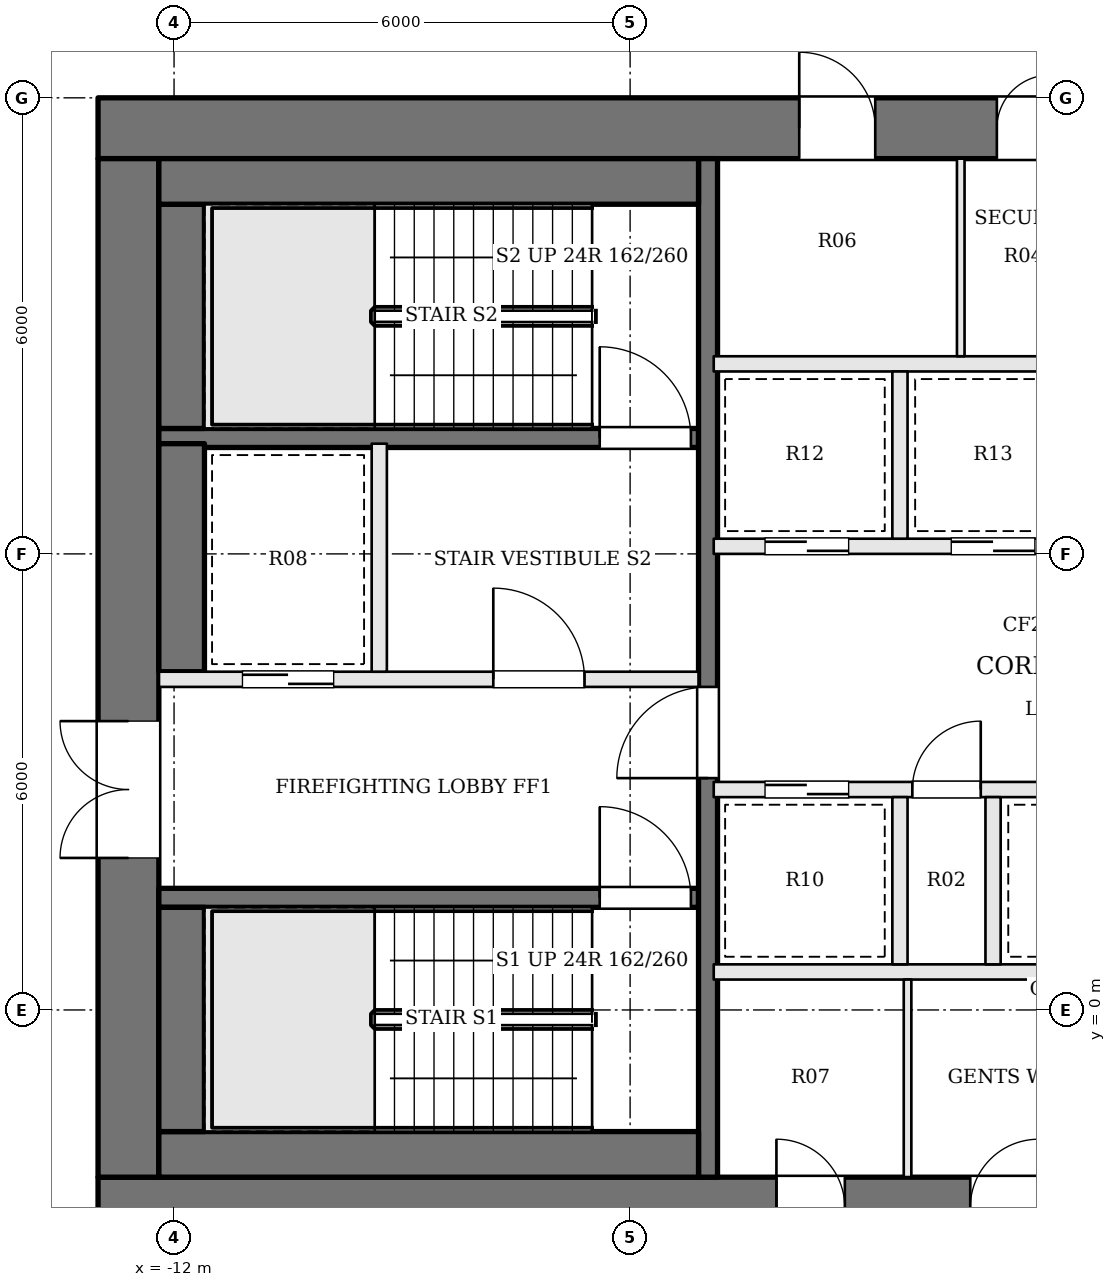
"""IFC4 building model, lengths in metres.
Left out: names, types, materials, properties, quantities, classifications, styles, units other than length and angle.
Written with IfcOpenShell. Run it as: python <this file> out.ifc"""

import sys

from ifc_helpers import new_model, si_unit, direction, frame, frame_2d, origin, place, context, subcontext, project, spatial, rectangle, extrude, element, fill, save


model = new_model("IFC4")
c1 = context("Model", 3, precision=1e-05, world=origin(), true_north=direction((0.0, 1.0)))
c2 = subcontext(c1, "Body", "Model", "MODEL_VIEW")
j1 = project(units=[si_unit("LENGTHUNIT", "METRE"), si_unit("PLANEANGLEUNIT", "RADIAN")], contexts=[c1])
p1 = place(None, origin())
s1 = spatial("IfcSite", under=j1, at=p1, CompositionType="ELEMENT")
p2 = place(p1, origin())
s2 = spatial("IfcBuilding", under=s1, at=p2, CompositionType="ELEMENT")
p3 = place(p2, frame((0.0, 0.0, 205.2)))
s3 = spatial("IfcBuildingStorey", under=s2, at=p3, CompositionType="ELEMENT", Elevation=205.2)
p4 = place(p3, frame((-13.0, 11.6, 0.0), z_axis=(0.0, 0.0, 1.0), x_axis=(1.0, 0.0, 0.0)))
e1 = element("IfcWall", 1, at=p4, inside=s3, PredefinedType="SHEAR", context=c2, shape_type="SweptSolid", body=[
    extrude(rectangle(XDim=26.0, YDim=0.8, at=frame_2d((13.0, 0.0))), origin(), (0.0, 0.0, 1.0), 3.9),
])
p5 = place(p4, frame((9.225, 0.0, 0.0)))
e2 = element("IfcOpeningElement", 2, at=p5, cuts=e1, PredefinedType="OPENING", context=c2, shape_type="SweptSolid", body=[
    extrude(rectangle(XDim=1.0, YDim=2.1, at=frame_2d((0.5, 1.05))), frame((0.0, 0.41, 0.0), z_axis=(0.0, -1.0, 0.0), x_axis=(1.0, 0.0, 0.0)), (0.0, 0.0, 1.0), 0.82),
])
p6 = place(p4, frame((11.825, 0.0, 0.0)))
e3 = element("IfcOpeningElement", 3, at=p6, cuts=e1, PredefinedType="OPENING", context=c2, shape_type="SweptSolid", body=[
    extrude(rectangle(XDim=0.7, YDim=2.1, at=frame_2d((0.35, 1.05))), frame((0.0, 0.41, 0.0), z_axis=(0.0, -1.0, 0.0), x_axis=(1.0, 0.0, 0.0)), (0.0, 0.0, 1.0), 0.82),
])
p7 = place(p4, frame((14.125, 0.0, 0.0)))
e4 = element("IfcOpeningElement", 4, at=p7, cuts=e1, PredefinedType="OPENING", context=c2, shape_type="SweptSolid", body=[
    extrude(rectangle(XDim=1.0, YDim=2.1, at=frame_2d((0.5, 1.05))), frame((0.0, 0.41, 0.0), z_axis=(0.0, -1.0, 0.0), x_axis=(1.0, 0.0, 0.0)), (0.0, 0.0, 1.0), 0.82),
])
p8 = place(p4, frame((16.625, 0.0, 0.0)))
e5 = element("IfcOpeningElement", 5, at=p8, cuts=e1, PredefinedType="OPENING", context=c2, shape_type="SweptSolid", body=[
    extrude(rectangle(XDim=0.9, YDim=2.1, at=frame_2d((0.45, 1.05))), frame((0.0, 0.41, 0.0), z_axis=(0.0, -1.0, 0.0), x_axis=(1.0, 0.0, 0.0)), (0.0, 0.0, 1.0), 0.82),
])
p9 = place(p3, frame((-13.0, -2.6, 0.0), z_axis=(0.0, 0.0, 1.0), x_axis=(1.0, 0.0, 0.0)))
e6 = element("IfcWall", 6, at=p9, inside=s3, PredefinedType="SHEAR", context=c2, shape_type="SweptSolid", body=[
    extrude(rectangle(XDim=26.0, YDim=0.8, at=frame_2d((13.0, 0.0))), origin(), (0.0, 0.0, 1.0), 3.9),
])
p10 = place(p9, frame((8.925, 0.0, 0.0)))
e7 = element("IfcOpeningElement", 7, at=p10, cuts=e6, PredefinedType="OPENING", context=c2, shape_type="SweptSolid", body=[
    extrude(rectangle(XDim=0.9, YDim=2.1, at=frame_2d((0.45, 1.05))), frame((0.0, 0.41, 0.0), z_axis=(0.0, -1.0, 0.0), x_axis=(1.0, 0.0, 0.0)), (0.0, 0.0, 1.0), 0.82),
])
p11 = place(p9, frame((11.475, 0.0, 0.0)))
e8 = element("IfcOpeningElement", 8, at=p11, cuts=e6, PredefinedType="OPENING", context=c2, shape_type="SweptSolid", body=[
    extrude(rectangle(XDim=0.9, YDim=2.1, at=frame_2d((0.45, 1.05))), frame((0.0, 0.41, 0.0), z_axis=(0.0, -1.0, 0.0), x_axis=(1.0, 0.0, 0.0)), (0.0, 0.0, 1.0), 0.82),
])
p12 = place(p9, frame((13.6, 0.0, 0.0)))
e9 = element("IfcOpeningElement", 9, at=p12, cuts=e6, PredefinedType="OPENING", context=c2, shape_type="SweptSolid", body=[
    extrude(rectangle(XDim=1.0, YDim=2.1, at=frame_2d((0.5, 1.05))), frame((0.0, 0.41, 0.0), z_axis=(0.0, -1.0, 0.0), x_axis=(1.0, 0.0, 0.0)), (0.0, 0.0, 1.0), 0.82),
])
p13 = place(p9, frame((15.95, 0.0, 0.0)))
e10 = element("IfcOpeningElement", 10, at=p13, cuts=e6, PredefinedType="OPENING", context=c2, shape_type="SweptSolid", body=[
    extrude(rectangle(XDim=1.0, YDim=2.1, at=frame_2d((0.5, 1.05))), frame((0.0, 0.41, 0.0), z_axis=(0.0, -1.0, 0.0), x_axis=(1.0, 0.0, 0.0)), (0.0, 0.0, 1.0), 0.82),
])
p14 = place(p3, frame((-12.6, -2.2, 0.0), z_axis=(0.0, 0.0, 1.0), x_axis=(0.0, 1.0, 0.0)))
e11 = element("IfcWall", 11, at=p14, inside=s3, PredefinedType="SHEAR", context=c2, shape_type="SweptSolid", body=[
    extrude(rectangle(XDim=13.4, YDim=0.8, at=frame_2d((6.7, 0.0))), origin(), (0.0, 0.0, 1.0), 3.9),
])
p15 = place(p14, frame((4.2, 0.0, 0.0)))
e12 = element("IfcOpeningElement", 12, at=p15, cuts=e11, PredefinedType="OPENING", context=c2, shape_type="SweptSolid", body=[
    extrude(rectangle(XDim=1.8, YDim=2.1, at=frame_2d((0.9, 1.05))), frame((0.0, 0.41, 0.0), z_axis=(0.0, -1.0, 0.0), x_axis=(1.0, 0.0, 0.0)), (0.0, 0.0, 1.0), 0.82),
])
p16 = place(p3, frame((-12.2, 1.475, 0.0), z_axis=(0.0, 0.0, 1.0), x_axis=(1.0, 0.0, 0.0)))
e13 = element("IfcWall", 13, at=p16, inside=s3, PredefinedType="SOLIDWALL", context=c2, shape_type="SweptSolid", body=[
    extrude(rectangle(XDim=7.1, YDim=0.25, at=frame_2d((3.55, 0.0))), origin(), (0.0, 0.0, 1.0), 3.7),
])
p17 = place(p16, frame((5.8, 0.0, 0.0)))
e14 = element("IfcOpeningElement", 14, at=p17, cuts=e13, PredefinedType="OPENING", context=c2, shape_type="SweptSolid", body=[
    extrude(rectangle(XDim=1.2, YDim=2.1, at=frame_2d((0.6, 1.05))), frame((0.0, 0.135, 0.0), z_axis=(0.0, -1.0, 0.0), x_axis=(1.0, 0.0, 0.0)), (0.0, 0.0, 1.0), 0.27),
])
p18 = place(p3, frame((-12.2, 4.35, 0.0), z_axis=(0.0, 0.0, 1.0), x_axis=(1.0, 0.0, 0.0)))
e15 = element("IfcWall", 15, at=p18, inside=s3, PredefinedType="SOLIDWALL", context=c2, shape_type="SweptSolid", body=[
    extrude(rectangle(XDim=7.1, YDim=0.2, at=frame_2d((3.55, 0.0))), origin(), (0.0, 0.0, 1.0), 3.7),
])
p19 = place(p18, frame((4.4, 0.0, 0.0)))
e16 = element("IfcOpeningElement", 16, at=p19, cuts=e15, PredefinedType="OPENING", context=c2, shape_type="SweptSolid", body=[
    extrude(rectangle(XDim=1.2, YDim=2.1, at=frame_2d((0.6, 1.05))), frame((0.0, 0.11, 0.0), z_axis=(0.0, -1.0, 0.0), x_axis=(1.0, 0.0, 0.0)), (0.0, 0.0, 1.0), 0.22),
])
p20 = place(p18, frame((1.1, 0.0, 0.0)))
e17 = element("IfcOpeningElement", 17, at=p20, cuts=e15, PredefinedType="OPENING", context=c2, shape_type="SweptSolid", body=[
    extrude(rectangle(XDim=1.2, YDim=2.1, at=frame_2d((0.6, 1.05))), frame((0.0, 0.11, 0.0), z_axis=(0.0, -1.0, 0.0), x_axis=(1.0, 0.0, 0.0)), (0.0, 0.0, 1.0), 0.22),
])
p21 = place(p3, frame((-12.2, 7.525, 0.0), z_axis=(0.0, 0.0, 1.0), x_axis=(1.0, 0.0, 0.0)))
e18 = element("IfcWall", 18, at=p21, inside=s3, PredefinedType="SOLIDWALL", context=c2, shape_type="SweptSolid", body=[
    extrude(rectangle(XDim=7.1, YDim=0.25, at=frame_2d((3.55, 0.0))), origin(), (0.0, 0.0, 1.0), 3.7),
])
p22 = place(p21, frame((5.8, 0.0, 0.0)))
e19 = element("IfcOpeningElement", 19, at=p22, cuts=e18, PredefinedType="OPENING", context=c2, shape_type="SweptSolid", body=[
    extrude(rectangle(XDim=1.2, YDim=2.1, at=frame_2d((0.6, 1.05))), frame((0.0, 0.135, 0.0), z_axis=(0.0, -1.0, 0.0), x_axis=(1.0, 0.0, 0.0)), (0.0, 0.0, 1.0), 0.27),
])
p23 = place(p3, frame((-9.3, 4.45, 0.0), z_axis=(0.0, 0.0, 1.0), x_axis=(0.0, 1.0, 0.0)))
e20 = element("IfcWall", 20, at=p23, inside=s3, PredefinedType="SOLIDWALL", context=c2, shape_type="SweptSolid", body=[
    extrude(rectangle(XDim=3.0, YDim=0.2, at=frame_2d((1.5, 0.0))), origin(), (0.0, 0.0, 1.0), 3.7),
])
p24 = place(p3, frame((-4.975, -2.2, 0.0), z_axis=(0.0, 0.0, 1.0), x_axis=(0.0, 1.0, 0.0)))
e21 = element("IfcWall", 21, at=p24, inside=s3, PredefinedType="SOLIDWALL", context=c2, shape_type="SweptSolid", body=[
    extrude(rectangle(XDim=13.4, YDim=0.25, at=frame_2d((6.7, 0.0))), origin(), (0.0, 0.0, 1.0), 3.7),
])
p25 = place(p24, frame((5.25, 0.0, 0.0)))
e22 = element("IfcOpeningElement", 22, at=p25, cuts=e21, PredefinedType="OPENING", context=c2, shape_type="SweptSolid", body=[
    extrude(rectangle(XDim=1.2, YDim=2.1, at=frame_2d((0.6, 1.05))), frame((0.0, 0.135, 0.0), z_axis=(0.0, -1.0, 0.0), x_axis=(1.0, 0.0, 0.0)), (0.0, 0.0, 1.0), 0.27),
])
p26 = place(p3, frame((-12.2, -1.9, 0.0), z_axis=(0.0, 0.0, 1.0), x_axis=(1.0, 0.0, 0.0)))
e23 = element("IfcWall", 23, at=p26, inside=s3, PredefinedType="SOLIDWALL", context=c2, shape_type="SweptSolid", body=[
    extrude(rectangle(XDim=7.1, YDim=0.6, at=frame_2d((3.55, 0.0))), origin(), (0.0, 0.0, 1.0), 3.7),
])
p27 = place(p3, frame((-11.9, -1.6, 0.0), z_axis=(0.0, 0.0, 1.0), x_axis=(0.0, 1.0, 0.0)))
e24 = element("IfcWall", 24, at=p27, inside=s3, PredefinedType="SOLIDWALL", context=c2, shape_type="SweptSolid", body=[
    extrude(rectangle(XDim=2.95, YDim=0.6, at=frame_2d((1.475, 0.0))), origin(), (0.0, 0.0, 1.0), 3.7),
])
p28 = place(p3, frame((-11.9, 4.45, 0.0), z_axis=(0.0, 0.0, 1.0), x_axis=(0.0, 1.0, 0.0)))
e25 = element("IfcWall", 25, at=p28, inside=s3, PredefinedType="SOLIDWALL", context=c2, shape_type="SweptSolid", body=[
    extrude(rectangle(XDim=3.0, YDim=0.6, at=frame_2d((1.5, 0.0))), origin(), (0.0, 0.0, 1.0), 3.7),
])
p29 = place(p3, frame((-11.9, 7.65, 0.0), z_axis=(0.0, 0.0, 1.0), x_axis=(0.0, 1.0, 0.0)))
e26 = element("IfcWall", 26, at=p29, inside=s3, PredefinedType="SOLIDWALL", context=c2, shape_type="SweptSolid", body=[
    extrude(rectangle(XDim=2.95, YDim=0.6, at=frame_2d((1.475, 0.0))), origin(), (0.0, 0.0, 1.0), 3.7),
])
p30 = place(p3, frame((-12.2, 10.9, 0.0), z_axis=(0.0, 0.0, 1.0), x_axis=(1.0, 0.0, 0.0)))
e27 = element("IfcWall", 27, at=p30, inside=s3, PredefinedType="SOLIDWALL", context=c2, shape_type="SweptSolid", body=[
    extrude(rectangle(XDim=7.1, YDim=0.6, at=frame_2d((3.55, 0.0))), origin(), (0.0, 0.0, 1.0), 3.7),
])
p31 = place(p3, frame((-4.9, 0.5, 0.0), z_axis=(0.0, 0.0, 1.0), x_axis=(1.0, 0.0, 0.0)))
e28 = element("IfcWall", 28, at=p31, inside=s3, PredefinedType="SOLIDWALL", context=c2, shape_type="SweptSolid", body=[
    extrude(rectangle(XDim=9.8, YDim=0.2, at=frame_2d((4.9, 0.0))), origin(), (0.0, 0.0, 1.0), 3.7),
])
p32 = place(p3, frame((-4.9, 2.9, 0.0), z_axis=(0.0, 0.0, 1.0), x_axis=(1.0, 0.0, 0.0)))
e29 = element("IfcWall", 29, at=p32, inside=s3, PredefinedType="SOLIDWALL", context=c2, shape_type="SweptSolid", body=[
    extrude(rectangle(XDim=9.8, YDim=0.2, at=frame_2d((4.9, 0.0))), origin(), (0.0, 0.0, 1.0), 3.7),
])
p33 = place(p32, frame((0.675, 0.0, 0.0)))
e30 = element("IfcOpeningElement", 30, at=p33, cuts=e29, PredefinedType="OPENING", context=c2, shape_type="SweptSolid", body=[
    extrude(rectangle(XDim=1.1, YDim=2.1, at=frame_2d((0.55, 1.05))), frame((0.0, 0.11, 0.0), z_axis=(0.0, -1.0, 0.0), x_axis=(1.0, 0.0, 0.0)), (0.0, 0.0, 1.0), 0.22),
])
p34 = place(p32, frame((2.613, 0.0, 0.0)))
e31 = element("IfcOpeningElement", 31, at=p34, cuts=e29, PredefinedType="OPENING", context=c2, shape_type="SweptSolid", body=[
    extrude(rectangle(XDim=0.9, YDim=2.1, at=frame_2d((0.45, 1.05))), frame((0.0, 0.11, 0.0), z_axis=(0.0, -1.0, 0.0), x_axis=(1.0, 0.0, 0.0)), (0.0, 0.0, 1.0), 0.22),
])
p35 = place(p32, frame((4.35, 0.0, 0.0)))
e32 = element("IfcOpeningElement", 32, at=p35, cuts=e29, PredefinedType="OPENING", context=c2, shape_type="SweptSolid", body=[
    extrude(rectangle(XDim=1.1, YDim=2.1, at=frame_2d((0.55, 1.05))), frame((0.0, 0.11, 0.0), z_axis=(0.0, -1.0, 0.0), x_axis=(1.0, 0.0, 0.0)), (0.0, 0.0, 1.0), 0.22),
])
p36 = place(p32, frame((7.463, 0.0, 0.0)))
e33 = element("IfcOpeningElement", 33, at=p36, cuts=e29, PredefinedType="OPENING", context=c2, shape_type="SweptSolid", body=[
    extrude(rectangle(XDim=1.0, YDim=2.1, at=frame_2d((0.5, 1.05))), frame((0.0, 0.11, 0.0), z_axis=(0.0, -1.0, 0.0), x_axis=(1.0, 0.0, 0.0)), (0.0, 0.0, 1.0), 0.22),
])
p37 = place(p3, frame((-4.9, 6.1, 0.0), z_axis=(0.0, 0.0, 1.0), x_axis=(1.0, 0.0, 0.0)))
e34 = element("IfcWall", 34, at=p37, inside=s3, PredefinedType="SOLIDWALL", context=c2, shape_type="SweptSolid", body=[
    extrude(rectangle(XDim=9.8, YDim=0.2, at=frame_2d((4.9, 0.0))), origin(), (0.0, 0.0, 1.0), 3.7),
])
p38 = place(p37, frame((0.675, 0.0, 0.0)))
e35 = element("IfcOpeningElement", 35, at=p38, cuts=e34, PredefinedType="OPENING", context=c2, shape_type="SweptSolid", body=[
    extrude(rectangle(XDim=1.1, YDim=2.1, at=frame_2d((0.55, 1.05))), frame((0.0, 0.11, 0.0), z_axis=(0.0, -1.0, 0.0), x_axis=(1.0, 0.0, 0.0)), (0.0, 0.0, 1.0), 0.22),
])
p39 = place(p37, frame((3.125, 0.0, 0.0)))
e36 = element("IfcOpeningElement", 36, at=p39, cuts=e34, PredefinedType="OPENING", context=c2, shape_type="SweptSolid", body=[
    extrude(rectangle(XDim=1.1, YDim=2.1, at=frame_2d((0.55, 1.05))), frame((0.0, 0.11, 0.0), z_axis=(0.0, -1.0, 0.0), x_axis=(1.0, 0.0, 0.0)), (0.0, 0.0, 1.0), 0.22),
])
p40 = place(p37, frame((5.575, 0.0, 0.0)))
e37 = element("IfcOpeningElement", 37, at=p40, cuts=e34, PredefinedType="OPENING", context=c2, shape_type="SweptSolid", body=[
    extrude(rectangle(XDim=1.1, YDim=2.1, at=frame_2d((0.55, 1.05))), frame((0.0, 0.11, 0.0), z_axis=(0.0, -1.0, 0.0), x_axis=(1.0, 0.0, 0.0)), (0.0, 0.0, 1.0), 0.22),
])
p41 = place(p37, frame((8.025, 0.0, 0.0)))
e38 = element("IfcOpeningElement", 38, at=p41, cuts=e34, PredefinedType="OPENING", context=c2, shape_type="SweptSolid", body=[
    extrude(rectangle(XDim=1.1, YDim=2.1, at=frame_2d((0.55, 1.05))), frame((0.0, 0.11, 0.0), z_axis=(0.0, -1.0, 0.0), x_axis=(1.0, 0.0, 0.0)), (0.0, 0.0, 1.0), 0.22),
])
p42 = place(p3, frame((-4.9, 8.5, 0.0), z_axis=(0.0, 0.0, 1.0), x_axis=(1.0, 0.0, 0.0)))
e39 = element("IfcWall", 39, at=p42, inside=s3, PredefinedType="SOLIDWALL", context=c2, shape_type="SweptSolid", body=[
    extrude(rectangle(XDim=9.8, YDim=0.2, at=frame_2d((4.9, 0.0))), origin(), (0.0, 0.0, 1.0), 3.7),
])
for number, where, z_axis, x_axis in (
    (40, (-2.45, 0.6, 0.0), (0.0, 0.0, 1.0), (0.0, 1.0, 0.0)),
    (41, (-1.225, 0.6, 0.0), (0.0, 0.0, 1.0), (0.0, 1.0, 0.0)),
    (42, (-2.45, 6.2, 0.0), (0.0, 0.0, 1.0), (0.0, 1.0, 0.0)),
):
    element("IfcWall", number, at=place(p3, frame(where, z_axis=z_axis, x_axis=x_axis)), inside=s3, PredefinedType="SOLIDWALL", context=c2, shape_type="SweptSolid", body=[
        extrude(rectangle(XDim=2.2, YDim=0.2, at=frame_2d((1.1, 0.0))), origin(), (0.0, 0.0, 1.0), 3.7),
    ])
for number, where, z_axis, x_axis in (
    (43, (-2.35, -2.2, 0.0), (0.0, 0.0, 1.0), (0.0, 1.0, 0.0)),
    (44, (-1.65, 8.6, 0.0), (0.0, 0.0, 1.0), (0.0, 1.0, 0.0)),
):
    element("IfcWall", number, at=place(p3, frame(where, z_axis=z_axis, x_axis=x_axis)), inside=s3, PredefinedType="PARTITIONING", context=c2, shape_type="SweptSolid", body=[
        extrude(rectangle(XDim=2.6, YDim=0.1, at=frame_2d((1.3, 0.0))), origin(), (0.0, 0.0, 1.0), 3.7),
    ])
p43 = place(p15, origin())
e45 = element("IfcDoor", 45, at=p43, inside=s3, OperationType="DOUBLE_DOOR_SINGLE_SWING", PredefinedType="DOOR", context=c2, shape_type="SweptSolid", body=[
    extrude(rectangle(XDim=1.8, YDim=2.1, at=frame_2d((0.9, 1.05))), frame((0.0, 0.025, 0.0), z_axis=(0.0, -1.0, 0.0), x_axis=(1.0, 0.0, 0.0)), (0.0, 0.0, 1.0), 0.05),
])
fill(e12, e45)
p44 = place(p25, origin())
e46 = element("IfcDoor", 46, at=p44, inside=s3, OperationType="SINGLE_SWING_LEFT", PredefinedType="DOOR", context=c2, shape_type="SweptSolid", body=[
    extrude(rectangle(XDim=1.2, YDim=2.1, at=frame_2d((0.6, 1.05))), frame((0.0, 0.025, 0.0), z_axis=(0.0, -1.0, 0.0), x_axis=(1.0, 0.0, 0.0)), (0.0, 0.0, 1.0), 0.05),
])
fill(e22, e46)
p45 = place(p19, origin())
e47 = element("IfcDoor", 47, at=p45, inside=s3, OperationType="SINGLE_SWING_LEFT", PredefinedType="DOOR", context=c2, shape_type="SweptSolid", body=[
    extrude(rectangle(XDim=1.2, YDim=2.1, at=frame_2d((0.6, 1.05))), frame((0.0, 0.025, 0.0), z_axis=(0.0, -1.0, 0.0), x_axis=(1.0, 0.0, 0.0)), (0.0, 0.0, 1.0), 0.05),
])
fill(e16, e47)
p46 = place(p17, origin())
e48 = element("IfcDoor", 48, at=p46, inside=s3, OperationType="SINGLE_SWING_LEFT", PredefinedType="DOOR", context=c2, shape_type="SweptSolid", body=[
    extrude(rectangle(XDim=1.2, YDim=2.1, at=frame_2d((0.6, 1.05))), frame((0.0, 0.025, 0.0), z_axis=(0.0, -1.0, 0.0), x_axis=(1.0, 0.0, 0.0)), (0.0, 0.0, 1.0), 0.05),
])
fill(e14, e48)
p47 = place(p22, origin())
e49 = element("IfcDoor", 49, at=p47, inside=s3, OperationType="SINGLE_SWING_LEFT", PredefinedType="DOOR", context=c2, shape_type="SweptSolid", body=[
    extrude(rectangle(XDim=1.2, YDim=2.1, at=frame_2d((0.6, 1.05))), frame((0.0, 0.025, 0.0), z_axis=(0.0, -1.0, 0.0), x_axis=(1.0, 0.0, 0.0)), (0.0, 0.0, 1.0), 0.05),
])
fill(e19, e49)
p48 = place(p20, origin())
e50 = element("IfcDoor", 50, at=p48, inside=s3, OperationType="SLIDING_TO_RIGHT", PredefinedType="DOOR", context=c2, shape_type="SweptSolid", body=[
    extrude(rectangle(XDim=1.2, YDim=2.1, at=frame_2d((0.6, 1.05))), frame((0.0, 0.025, 0.0), z_axis=(0.0, -1.0, 0.0), x_axis=(1.0, 0.0, 0.0)), (0.0, 0.0, 1.0), 0.05),
])
fill(e17, e50)
p49 = place(p33, origin())
e51 = element("IfcDoor", 51, at=p49, inside=s3, OperationType="SLIDING_TO_RIGHT", PredefinedType="DOOR", context=c2, shape_type="SweptSolid", body=[
    extrude(rectangle(XDim=1.1, YDim=2.1, at=frame_2d((0.55, 1.05))), frame((0.0, 0.025, 0.0), z_axis=(0.0, -1.0, 0.0), x_axis=(1.0, 0.0, 0.0)), (0.0, 0.0, 1.0), 0.05),
])
fill(e30, e51)
p50 = place(p34, origin())
e52 = element("IfcDoor", 52, at=p50, inside=s3, OperationType="SINGLE_SWING_RIGHT", PredefinedType="DOOR", context=c2, shape_type="SweptSolid", body=[
    extrude(rectangle(XDim=0.9, YDim=2.1, at=frame_2d((0.45, 1.05))), frame((0.0, 0.025, 0.0), z_axis=(0.0, -1.0, 0.0), x_axis=(1.0, 0.0, 0.0)), (0.0, 0.0, 1.0), 0.05),
])
fill(e31, e52)
p51 = place(p38, origin())
e53 = element("IfcDoor", 53, at=p51, inside=s3, OperationType="SLIDING_TO_RIGHT", PredefinedType="DOOR", context=c2, shape_type="SweptSolid", body=[
    extrude(rectangle(XDim=1.1, YDim=2.1, at=frame_2d((0.55, 1.05))), frame((0.0, 0.025, 0.0), z_axis=(0.0, -1.0, 0.0), x_axis=(1.0, 0.0, 0.0)), (0.0, 0.0, 1.0), 0.05),
])
fill(e35, e53)
p52 = place(p39, origin())
e54 = element("IfcDoor", 54, at=p52, inside=s3, OperationType="SLIDING_TO_LEFT", PredefinedType="DOOR", context=c2, shape_type="SweptSolid", body=[
    extrude(rectangle(XDim=1.1, YDim=2.1, at=frame_2d((0.55, 1.05))), frame((0.0, 0.025, 0.0), z_axis=(0.0, -1.0, 0.0), x_axis=(1.0, 0.0, 0.0)), (0.0, 0.0, 1.0), 0.05),
])
fill(e36, e54)
p53 = place(p10, origin())
e55 = element("IfcDoor", 55, at=p53, inside=s3, OperationType="SINGLE_SWING_LEFT", PredefinedType="DOOR", context=c2, shape_type="SweptSolid", body=[
    extrude(rectangle(XDim=0.9, YDim=2.1, at=frame_2d((0.45, 1.05))), frame((0.0, 0.025, 0.0), z_axis=(0.0, -1.0, 0.0), x_axis=(1.0, 0.0, 0.0)), (0.0, 0.0, 1.0), 0.05),
])
fill(e7, e55)
p54 = place(p11, origin())
e56 = element("IfcDoor", 56, at=p54, inside=s3, OperationType="SINGLE_SWING_RIGHT", PredefinedType="DOOR", context=c2, shape_type="SweptSolid", body=[
    extrude(rectangle(XDim=0.9, YDim=2.1, at=frame_2d((0.45, 1.05))), frame((0.0, 0.025, 0.0), z_axis=(0.0, -1.0, 0.0), x_axis=(1.0, 0.0, 0.0)), (0.0, 0.0, 1.0), 0.05),
])
fill(e8, e56)
p55 = place(p5, origin())
e57 = element("IfcDoor", 57, at=p55, inside=s3, OperationType="SINGLE_SWING_LEFT", PredefinedType="DOOR", context=c2, shape_type="SweptSolid", body=[
    extrude(rectangle(XDim=1.0, YDim=2.1, at=frame_2d((0.5, 1.05))), frame((0.0, 0.025, 0.0), z_axis=(0.0, -1.0, 0.0), x_axis=(1.0, 0.0, 0.0)), (0.0, 0.0, 1.0), 0.05),
])
fill(e2, e57)
p56 = place(p6, origin())
e58 = element("IfcDoor", 58, at=p56, inside=s3, OperationType="SINGLE_SWING_RIGHT", PredefinedType="DOOR", context=c2, shape_type="SweptSolid", body=[
    extrude(rectangle(XDim=0.7, YDim=2.1, at=frame_2d((0.35, 1.05))), frame((0.0, 0.025, 0.0), z_axis=(0.0, -1.0, 0.0), x_axis=(1.0, 0.0, 0.0)), (0.0, 0.0, 1.0), 0.05),
])
fill(e3, e58)
save(model, sys.argv[1])
